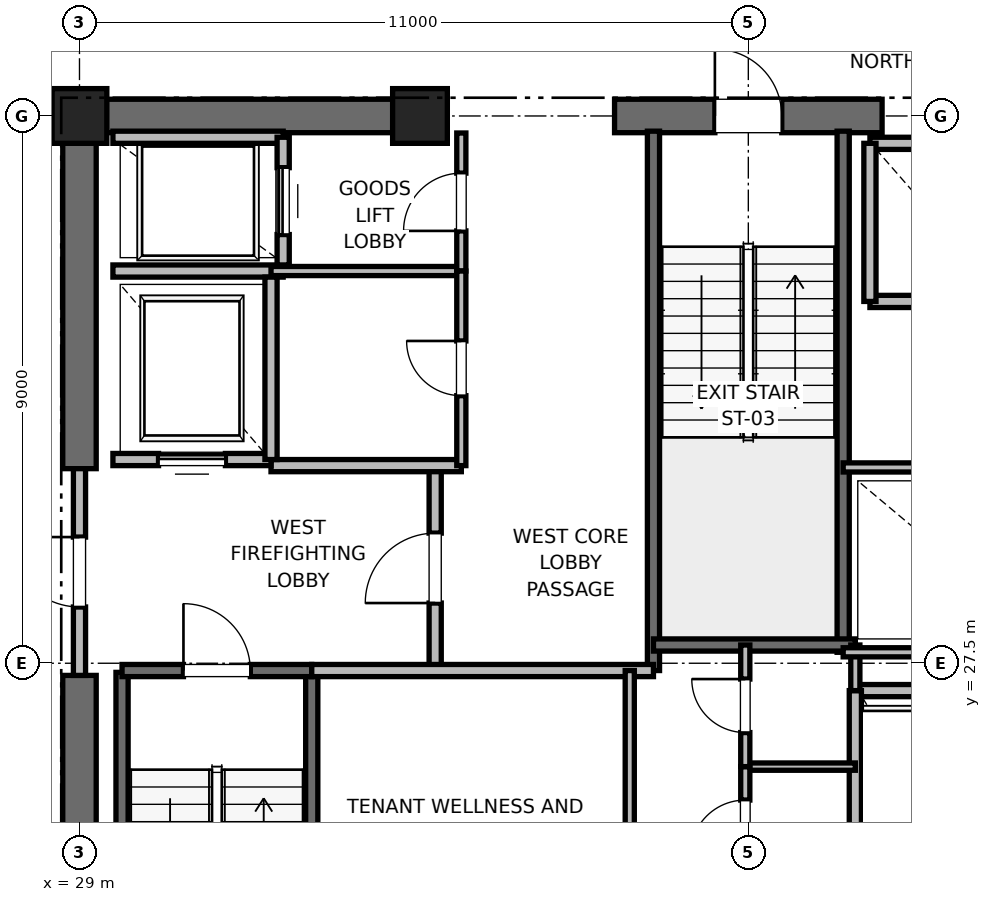
"""IFC4 building model, lengths in metres.
Left out: names, types, materials, properties, quantities, classifications, styles, units other than length and angle.
Written with IfcOpenShell. Run it as: python <this file> out.ifc"""

import sys

from ifc_helpers import new_model, si_unit, direction, frame, frame_2d, origin, origin_2d, place, context, subcontext, project, spatial, rectangle, extrude, element, fill, save


model = new_model("IFC4")
c1 = context("Model", 3, precision=1e-05, world=origin(), true_north=direction((0.0, 1.0)))
c2 = subcontext(c1, "Body", "Model", "MODEL_VIEW")
j1 = project(units=[si_unit("LENGTHUNIT", "METRE"), si_unit("PLANEANGLEUNIT", "RADIAN")], contexts=[c1])
p1 = place(None, origin())
s1 = spatial("IfcSite", under=j1, at=p1, CompositionType="ELEMENT")
p2 = place(p1, origin())
s2 = spatial("IfcBuilding", under=s1, at=p2, CompositionType="ELEMENT")
p3 = place(p2, frame((0.0, 0.0, 225.2)))
s3 = spatial("IfcBuildingStorey", under=s2, at=p3, CompositionType="ELEMENT", Elevation=225.2)
for number, where, z_axis, x_axis in (
    (1, (29.0, 36.5, 0.0), (0.0, 0.0, 1.0), (1.0, 0.0, 0.0)),
    (2, (34.6, 36.5, 0.0), (0.0, 0.0, 1.0), (1.0, 0.0, 0.0)),
):
    element("IfcColumn", number, at=place(p3, frame(where, z_axis=z_axis, x_axis=x_axis)), inside=s3, PredefinedType="PILASTER", context=c2, shape_type="SweptSolid", body=[
        extrude(rectangle(XDim=0.9, YDim=0.9, at=origin_2d()), origin(), (0.0, 0.0, 1.0), 4.0),
    ])
p4 = place(p3, frame((29.0, 36.5, 0.0), z_axis=(0.0, 0.0, 1.0), x_axis=(1.0, 0.0, 0.0)))
e3 = element("IfcWall", 3, at=p4, inside=s3, PredefinedType="SHEAR", context=c2, shape_type="SweptSolid", body=[
    extrude(rectangle(XDim=5.8, YDim=0.55, at=frame_2d((2.9, 0.0))), origin(), (0.0, 0.0, 1.0), 3.775),
])
p5 = place(p3, frame((37.8, 36.5, 0.0), z_axis=(0.0, 0.0, 1.0), x_axis=(1.0, 0.0, 0.0)))
e4 = element("IfcWall", 4, at=p5, inside=s3, PredefinedType="SHEAR", context=c2, shape_type="SweptSolid", body=[
    extrude(rectangle(XDim=4.4, YDim=0.55, at=frame_2d((2.2, 0.0))), origin(), (0.0, 0.0, 1.0), 3.775),
])
p6 = place(p5, frame((1.65, 0.0, 0.0)))
e5 = element("IfcOpeningElement", 5, at=p6, cuts=e4, PredefinedType="OPENING", context=c2, shape_type="SweptSolid", body=[
    extrude(rectangle(XDim=1.1, YDim=2.15, at=frame_2d((0.55, 1.075))), frame((0.0, 0.275, 0.0), z_axis=(0.0, -1.0, 0.0), x_axis=(1.0, 0.0, 0.0)), (0.0, 0.0, 1.0), 0.55),
])
p7 = place(p3, frame((29.0, 18.5, 0.0), z_axis=(0.0, 0.0, 1.0), x_axis=(0.0, 1.0, 0.0)))
e6 = element("IfcWall", 6, at=p7, inside=s3, PredefinedType="SHEAR", context=c2, shape_type="SweptSolid", body=[
    extrude(rectangle(XDim=8.8, YDim=0.55, at=frame_2d((4.4, 0.0))), origin(), (0.0, 0.0, 1.0), 3.775),
])
p8 = place(p3, frame((29.0, 30.7, 0.0), z_axis=(0.0, 0.0, 1.0), x_axis=(0.0, 1.0, 0.0)))
e7 = element("IfcWall", 7, at=p8, inside=s3, PredefinedType="SHEAR", context=c2, shape_type="SweptSolid", body=[
    extrude(rectangle(XDim=5.8, YDim=0.55, at=frame_2d((2.9, 0.0))), origin(), (0.0, 0.0, 1.0), 3.775),
])
p9 = place(p3, frame((29.7, 19.2, 0.0), z_axis=(0.0, 0.0, 1.0), x_axis=(0.0, 1.0, 0.0)))
e8 = element("IfcWall", 8, at=p9, inside=s3, PredefinedType="SOLIDWALL", context=c2, shape_type="SweptSolid", body=[
    extrude(rectangle(XDim=8.15, YDim=0.2, at=frame_2d((4.075, 0.0))), origin(), (0.0, 0.0, 1.0), 3.775),
])
p10 = place(p3, frame((32.82, 18.6, 0.0), z_axis=(0.0, 0.0, 1.0), x_axis=(0.0, 1.0, 0.0)))
e9 = element("IfcWall", 9, at=p10, inside=s3, PredefinedType="SOLIDWALL", context=c2, shape_type="SweptSolid", body=[
    extrude(rectangle(XDim=8.78, YDim=0.2, at=frame_2d((4.39, 0.0))), origin(), (0.0, 0.0, 1.0), 3.775),
])
p11 = place(p3, frame((29.7, 27.38, 0.0), z_axis=(0.0, 0.0, 1.0), x_axis=(1.0, 0.0, 0.0)))
e10 = element("IfcWall", 10, at=p11, inside=s3, PredefinedType="SOLIDWALL", context=c2, shape_type="SweptSolid", body=[
    extrude(rectangle(XDim=3.12, YDim=0.2, at=frame_2d((1.56, 0.0))), origin(), (0.0, 0.0, 1.0), 3.775),
])
p12 = place(p11, frame((1.01, 0.0, 0.0)))
e11 = element("IfcOpeningElement", 11, at=p12, cuts=e10, PredefinedType="OPENING", context=c2, shape_type="SweptSolid", body=[
    extrude(rectangle(XDim=1.1, YDim=2.15, at=frame_2d((0.55, 1.075))), frame((0.0, 0.1, 0.0), z_axis=(0.0, -1.0, 0.0), x_axis=(1.0, 0.0, 0.0)), (0.0, 0.0, 1.0), 0.2),
])
p13 = place(p3, frame((38.44, 27.38, 0.0), z_axis=(0.0, 0.0, 1.0), x_axis=(0.0, 1.0, 0.0)))
e12 = element("IfcWall", 12, at=p13, inside=s3, PredefinedType="SOLIDWALL", context=c2, shape_type="SweptSolid", body=[
    extrude(rectangle(XDim=8.87, YDim=0.2, at=frame_2d((4.435, 0.0))), origin(), (0.0, 0.0, 1.0), 3.775),
])
p14 = place(p3, frame((41.56, 27.68, 0.0), z_axis=(0.0, 0.0, 1.0), x_axis=(0.0, 1.0, 0.0)))
e13 = element("IfcWall", 13, at=p14, inside=s3, PredefinedType="SOLIDWALL", context=c2, shape_type="SweptSolid", body=[
    extrude(rectangle(XDim=8.57, YDim=0.2, at=frame_2d((4.285, 0.0))), origin(), (0.0, 0.0, 1.0), 3.775),
])
p15 = place(p3, frame((38.44, 27.8, 0.0), z_axis=(0.0, 0.0, 1.0), x_axis=(1.0, 0.0, 0.0)))
e14 = element("IfcWall", 14, at=p15, inside=s3, PredefinedType="SOLIDWALL", context=c2, shape_type="SweptSolid", body=[
    extrude(rectangle(XDim=3.32, YDim=0.2, at=frame_2d((1.66, 0.0))), origin(), (0.0, 0.0, 1.0), 3.775),
])
p16 = place(p3, frame((34.85, 27.38, 0.0), z_axis=(0.0, 0.0, 1.0), x_axis=(0.0, 1.0, 0.0)))
e15 = element("IfcWall", 15, at=p16, inside=s3, PredefinedType="PARTITIONING", context=c2, shape_type="SweptSolid", body=[
    extrude(rectangle(XDim=3.37, YDim=0.2, at=frame_2d((1.685, 0.0))), origin(), (0.0, 0.0, 1.0), 3.775),
])
p17 = place(p16, frame((1.11, 0.0, 0.0)))
e16 = element("IfcOpeningElement", 16, at=p17, cuts=e15, PredefinedType="OPENING", context=c2, shape_type="SweptSolid", body=[
    extrude(rectangle(XDim=1.15, YDim=2.2, at=frame_2d((0.575, 1.1))), frame((0.0, 0.1, 0.0), z_axis=(0.0, -1.0, 0.0), x_axis=(1.0, 0.0, 0.0)), (0.0, 0.0, 1.0), 0.2),
])
p18 = place(p3, frame((29.0, 27.3, 0.0), z_axis=(0.0, 0.0, 1.0), x_axis=(0.0, 1.0, 0.0)))
e17 = element("IfcWall", 17, at=p18, inside=s3, PredefinedType="PARTITIONING", context=c2, shape_type="SweptSolid", body=[
    extrude(rectangle(XDim=3.4, YDim=0.2, at=frame_2d((1.7, 0.0))), origin(), (0.0, 0.0, 1.0), 2.755),
])
p19 = place(p18, frame((1.125, 0.0, 0.0)))
e18 = element("IfcOpeningElement", 18, at=p19, cuts=e17, PredefinedType="OPENING", context=c2, shape_type="SweptSolid", body=[
    extrude(rectangle(XDim=1.15, YDim=2.2, at=frame_2d((0.575, 1.1))), frame((0.0, 0.1, 0.0), z_axis=(0.0, -1.0, 0.0), x_axis=(1.0, 0.0, 0.0)), (0.0, 0.0, 1.0), 0.2),
])
p20 = place(p3, frame((32.82, 27.38, 0.0), z_axis=(0.0, 0.0, 1.0), x_axis=(1.0, 0.0, 0.0)))
e19 = element("IfcWall", 19, at=p20, inside=s3, PredefinedType="PARTITIONING", context=c2, shape_type="SweptSolid", body=[
    extrude(rectangle(XDim=5.62, YDim=0.2, at=frame_2d((2.81, 0.0))), origin(), (0.0, 0.0, 1.0), 3.775),
])
p21 = place(p3, frame((32.15, 30.75, 0.0), z_axis=(0.0, 0.0, 1.0), x_axis=(1.0, 0.0, 0.0)))
e20 = element("IfcWall", 20, at=p21, inside=s3, PredefinedType="PARTITIONING", context=c2, shape_type="SweptSolid", body=[
    extrude(rectangle(XDim=3.13, YDim=0.2, at=frame_2d((1.565, 0.0))), origin(), (0.0, 0.0, 1.0), 3.775),
])
p22 = place(p3, frame((29.55, 30.85, 0.0), z_axis=(0.0, 0.0, 1.0), x_axis=(1.0, 0.0, 0.0)))
e21 = element("IfcWall", 21, at=p22, inside=s3, PredefinedType="SOLIDWALL", context=c2, shape_type="SweptSolid", body=[
    extrude(rectangle(XDim=2.6, YDim=0.2, at=frame_2d((1.3, 0.0))), origin(), (0.0, 0.0, 1.0), 2.755),
])
p23 = place(p22, frame((0.75, 0.0, 0.0)))
e22 = element("IfcOpeningElement", 22, at=p23, cuts=e21, PredefinedType="OPENING", context=c2, shape_type="SweptSolid", body=[
    extrude(rectangle(XDim=1.1, YDim=2.2, at=frame_2d((0.55, 1.1))), frame((0.0, 0.1, 0.0), z_axis=(0.0, -1.0, 0.0), x_axis=(1.0, 0.0, 0.0)), (0.0, 0.0, 1.0), 0.2),
])
p24 = place(p3, frame((29.55, 33.95, 0.0), z_axis=(0.0, 0.0, 1.0), x_axis=(1.0, 0.0, 0.0)))
e23 = element("IfcWall", 23, at=p24, inside=s3, PredefinedType="SOLIDWALL", context=c2, shape_type="SweptSolid", body=[
    extrude(rectangle(XDim=2.8, YDim=0.2, at=frame_2d((1.4, 0.0))), origin(), (0.0, 0.0, 1.0), 3.775),
])
p25 = place(p3, frame((32.15, 30.85, 0.0), z_axis=(0.0, 0.0, 1.0), x_axis=(0.0, 1.0, 0.0)))
e24 = element("IfcWall", 24, at=p25, inside=s3, PredefinedType="SOLIDWALL", context=c2, shape_type="SweptSolid", body=[
    extrude(rectangle(XDim=3.0, YDim=0.2, at=frame_2d((1.5, 0.0))), origin(), (0.0, 0.0, 1.0), 3.775),
])
p26 = place(p3, frame((32.35, 36.15, 0.0), z_axis=(0.0, 0.0, 1.0), x_axis=(-1.0, 0.0, 0.0)))
e25 = element("IfcWall", 25, at=p26, inside=s3, PredefinedType="SOLIDWALL", context=c2, shape_type="SweptSolid", body=[
    extrude(rectangle(XDim=2.8, YDim=0.2, at=frame_2d((1.4, 0.0))), origin(), (0.0, 0.0, 1.0), 3.062),
])
p27 = place(p3, frame((32.35, 34.05, 0.0), z_axis=(0.0, 0.0, 1.0), x_axis=(0.0, 1.0, 0.0)))
e26 = element("IfcWall", 26, at=p27, inside=s3, PredefinedType="SOLIDWALL", context=c2, shape_type="SweptSolid", body=[
    extrude(rectangle(XDim=2.1, YDim=0.2, at=frame_2d((1.05, 0.0))), origin(), (0.0, 0.0, 1.0), 3.775),
])
p28 = place(p27, frame((0.5, 0.0, 0.0)))
e27 = element("IfcOpeningElement", 27, at=p28, cuts=e26, PredefinedType="OPENING", context=c2, shape_type="SweptSolid", body=[
    extrude(rectangle(XDim=1.1, YDim=2.2, at=frame_2d((0.55, 1.1))), frame((0.0, 0.1, 0.0), z_axis=(0.0, -1.0, 0.0), x_axis=(1.0, 0.0, 0.0)), (0.0, 0.0, 1.0), 0.2),
])
p29 = place(p3, frame((43.44, 27.05, 0.0), z_axis=(0.0, 0.0, 1.0), x_axis=(-1.0, 0.0, 0.0)))
e28 = element("IfcWall", 28, at=p29, inside=s3, PredefinedType="SOLIDWALL", context=c2, shape_type="SweptSolid", body=[
    extrude(rectangle(XDim=1.68, YDim=0.2, at=frame_2d((0.84, 0.0))), origin(), (0.0, 0.0, 1.0), 3.775),
])
p30 = place(p3, frame((41.76, 27.05, 0.0), z_axis=(0.0, 0.0, 1.0), x_axis=(0.0, -1.0, 0.0)))
e29 = element("IfcWall", 29, at=p30, inside=s3, PredefinedType="SOLIDWALL", context=c2, shape_type="SweptSolid", body=[
    extrude(rectangle(XDim=2.6, YDim=0.2, at=frame_2d((1.3, 0.0))), origin(), (0.0, 0.0, 1.0), 3.775),
])
p31 = place(p3, frame((42.0, 33.45, 0.0), z_axis=(0.0, 0.0, 1.0), x_axis=(1.0, 0.0, 0.0)))
e30 = element("IfcWall", 30, at=p31, inside=s3, PredefinedType="SOLIDWALL", context=c2, shape_type="SweptSolid", body=[
    extrude(rectangle(XDim=2.3, YDim=0.2, at=frame_2d((1.15, 0.0))), origin(), (0.0, 0.0, 1.0), 3.775),
])
p32 = place(p3, frame((44.3, 36.05, 0.0), z_axis=(0.0, 0.0, 1.0), x_axis=(-1.0, 0.0, 0.0)))
e31 = element("IfcWall", 31, at=p32, inside=s3, PredefinedType="SOLIDWALL", context=c2, shape_type="SweptSolid", body=[
    extrude(rectangle(XDim=2.3, YDim=0.2, at=frame_2d((1.15, 0.0))), origin(), (0.0, 0.0, 1.0), 2.755),
])
p33 = place(p3, frame((42.0, 36.05, 0.0), z_axis=(0.0, 0.0, 1.0), x_axis=(0.0, -1.0, 0.0)))
e32 = element("IfcWall", 32, at=p33, inside=s3, PredefinedType="SOLIDWALL", context=c2, shape_type="SweptSolid", body=[
    extrude(rectangle(XDim=2.6, YDim=0.2, at=frame_2d((1.3, 0.0))), origin(), (0.0, 0.0, 1.0), 2.755),
])
p34 = place(p3, frame((39.95, 25.8, 0.0), z_axis=(0.0, 0.0, 1.0), x_axis=(1.0, 0.0, 0.0)))
e33 = element("IfcWall", 33, at=p34, inside=s3, PredefinedType="PARTITIONING", context=c2, shape_type="SweptSolid", body=[
    extrude(rectangle(XDim=1.81, YDim=0.12, at=frame_2d((0.905, 0.0))), origin(), (0.0, 0.0, 1.0), 2.85),
])
p35 = place(p3, frame((41.76, 27.05, 0.0), z_axis=(0.0, 0.0, 1.0), x_axis=(0.0, 1.0, 0.0)))
e34 = element("IfcWall", 34, at=p35, inside=s3, PredefinedType="PARTITIONING", context=c2, shape_type="SweptSolid", body=[
    extrude(rectangle(XDim=0.75, YDim=0.15, at=frame_2d((0.375, 0.0))), origin(), (0.0, 0.0, 1.0), 2.85),
])
p36 = place(p3, frame((39.95, 23.8, 0.0), z_axis=(0.0, 0.0, 1.0), x_axis=(0.0, 1.0, 0.0)))
e35 = element("IfcWall", 35, at=p36, inside=s3, PredefinedType="PARTITIONING", context=c2, shape_type="SweptSolid", body=[
    extrude(rectangle(XDim=2.0, YDim=0.15, at=frame_2d((1.0, 0.0))), origin(), (0.0, 0.0, 1.0), 2.85),
])
p37 = place(p36, frame((0.55, 0.0, 0.0)))
e36 = element("IfcOpeningElement", 36, at=p37, cuts=e35, PredefinedType="OPENING", context=c2, shape_type="SweptSolid", body=[
    extrude(rectangle(XDim=0.9, YDim=2.1, at=frame_2d((0.45, 1.05))), frame((0.0, 0.075, 0.0), z_axis=(0.0, -1.0, 0.0), x_axis=(1.0, 0.0, 0.0)), (0.0, 0.0, 1.0), 0.15),
])
p38 = place(p3, frame((39.95, 25.8, 0.0), z_axis=(0.0, 0.0, 1.0), x_axis=(0.0, 1.0, 0.0)))
e37 = element("IfcWall", 37, at=p38, inside=s3, PredefinedType="PARTITIONING", context=c2, shape_type="SweptSolid", body=[
    extrude(rectangle(XDim=2.0, YDim=0.15, at=frame_2d((1.0, 0.0))), origin(), (0.0, 0.0, 1.0), 2.85),
])
p39 = place(p38, frame((0.56, 0.0, 0.0)))
e38 = element("IfcOpeningElement", 38, at=p39, cuts=e37, PredefinedType="OPENING", context=c2, shape_type="SweptSolid", body=[
    extrude(rectangle(XDim=0.88, YDim=2.1, at=frame_2d((0.44, 1.05))), frame((0.0, 0.075, 0.0), z_axis=(0.0, -1.0, 0.0), x_axis=(1.0, 0.0, 0.0)), (0.0, 0.0, 1.0), 0.15),
])
p40 = place(p3, frame((32.15, 33.95, 0.0), z_axis=(0.0, 0.0, 1.0), x_axis=(1.0, 0.0, 0.0)))
e39 = element("IfcWall", 39, at=p40, inside=s3, PredefinedType="PARTITIONING", context=c2, shape_type="SweptSolid", body=[
    extrude(rectangle(XDim=3.13, YDim=0.15, at=frame_2d((1.565, 0.0))), origin(), (0.0, 0.0, 1.0), 2.85),
])
p41 = place(p3, frame((35.28, 33.95, 0.0), z_axis=(0.0, 0.0, 1.0), x_axis=(0.0, 1.0, 0.0)))
e40 = element("IfcWall", 40, at=p41, inside=s3, PredefinedType="PARTITIONING", context=c2, shape_type="SweptSolid", body=[
    extrude(rectangle(XDim=2.27, YDim=0.15, at=frame_2d((1.135, 0.0))), origin(), (0.0, 0.0, 1.0), 2.755),
])
p42 = place(p41, frame((0.66, 0.0, 0.0)))
e41 = element("IfcOpeningElement", 41, at=p42, cuts=e40, PredefinedType="OPENING", context=c2, shape_type="SweptSolid", body=[
    extrude(rectangle(XDim=0.95, YDim=2.15, at=frame_2d((0.475, 1.075))), frame((0.0, 0.075, 0.0), z_axis=(0.0, -1.0, 0.0), x_axis=(1.0, 0.0, 0.0)), (0.0, 0.0, 1.0), 0.15),
])
p43 = place(p3, frame((35.28, 30.75, 0.0), z_axis=(0.0, 0.0, 1.0), x_axis=(0.0, 1.0, 0.0)))
e42 = element("IfcWall", 42, at=p43, inside=s3, PredefinedType="PARTITIONING", context=c2, shape_type="SweptSolid", body=[
    extrude(rectangle(XDim=3.2, YDim=0.15, at=frame_2d((1.6, 0.0))), origin(), (0.0, 0.0, 1.0), 2.85),
])
p44 = place(p43, frame((1.15, 0.0, 0.0)))
e43 = element("IfcOpeningElement", 43, at=p44, cuts=e42, PredefinedType="OPENING", context=c2, shape_type="SweptSolid", body=[
    extrude(rectangle(XDim=0.9, YDim=2.1, at=frame_2d((0.45, 1.05))), frame((0.0, 0.075, 0.0), z_axis=(0.0, -1.0, 0.0), x_axis=(1.0, 0.0, 0.0)), (0.0, 0.0, 1.0), 0.15),
])
p45 = place(p3, frame((38.05, 18.6, 0.0), z_axis=(0.0, 0.0, 1.0), x_axis=(0.0, 1.0, 0.0)))
e44 = element("IfcWall", 44, at=p45, inside=s3, PredefinedType="PARTITIONING", context=c2, shape_type="SweptSolid", body=[
    extrude(rectangle(XDim=8.78, YDim=0.15, at=frame_2d((4.39, 0.0))), origin(), (0.0, 0.0, 1.0), 2.755),
])
p46 = place(p45, frame((3.89, 0.0, 0.0)))
e45 = element("IfcOpeningElement", 45, at=p46, cuts=e44, PredefinedType="OPENING", context=c2, shape_type="SweptSolid", body=[
    extrude(rectangle(XDim=1.0, YDim=2.15, at=frame_2d((0.5, 1.075))), frame((0.0, 0.075, 0.0), z_axis=(0.0, -1.0, 0.0), x_axis=(1.0, 0.0, 0.0)), (0.0, 0.0, 1.0), 0.15),
])
p47 = place(p3, frame((41.56, 27.68, 0.0), z_axis=(0.0, 0.0, 1.0), x_axis=(1.0, 0.0, 0.0)))
e46 = element("IfcWall", 46, at=p47, inside=s3, PredefinedType="PARTITIONING", context=c2, shape_type="SweptSolid", body=[
    extrude(rectangle(XDim=3.59, YDim=0.15, at=frame_2d((1.795, 0.0))), origin(), (0.0, 0.0, 1.0), 2.85),
])
p48 = place(p3, frame((41.56, 30.72, 0.0), z_axis=(0.0, 0.0, 1.0), x_axis=(1.0, 0.0, 0.0)))
e47 = element("IfcWall", 47, at=p48, inside=s3, PredefinedType="PARTITIONING", context=c2, shape_type="SweptSolid", body=[
    extrude(rectangle(XDim=3.59, YDim=0.15, at=frame_2d((1.795, 0.0))), origin(), (0.0, 0.0, 1.0), 2.85),
])
p49 = place(p48, frame((1.355, 0.0, 0.0)))
e48 = element("IfcOpeningElement", 48, at=p49, cuts=e47, PredefinedType="OPENING", context=c2, shape_type="SweptSolid", body=[
    extrude(rectangle(XDim=0.88, YDim=2.1, at=frame_2d((0.44, 1.05))), frame((0.0, 0.075, 0.0), z_axis=(0.0, -1.0, 0.0), x_axis=(1.0, 0.0, 0.0)), (0.0, 0.0, 1.0), 0.15),
])
p50 = place(p12, origin())
e49 = element("IfcDoor", 49, at=p50, inside=s3, OperationType="SINGLE_SWING_LEFT", PredefinedType="DOOR", context=c2, shape_type="SweptSolid", body=[
    extrude(rectangle(XDim=1.1, YDim=2.15, at=frame_2d((0.55, 1.075))), frame((0.0, 0.025, 0.0), z_axis=(0.0, -1.0, 0.0), x_axis=(1.0, 0.0, 0.0)), (0.0, 0.0, 1.0), 0.05),
])
fill(e11, e49)
p51 = place(p6, origin())
e50 = element("IfcDoor", 50, at=p51, inside=s3, OperationType="SINGLE_SWING_LEFT", PredefinedType="DOOR", context=c2, shape_type="SweptSolid", body=[
    extrude(rectangle(XDim=1.1, YDim=2.15, at=frame_2d((0.55, 1.075))), frame((0.0, 0.025, 0.0), z_axis=(0.0, -1.0, 0.0), x_axis=(1.0, 0.0, 0.0)), (0.0, 0.0, 1.0), 0.05),
])
fill(e5, e50)
p52 = place(p17, origin())
e51 = element("IfcDoor", 51, at=p52, inside=s3, OperationType="SINGLE_SWING_LEFT", PredefinedType="DOOR", context=c2, shape_type="SweptSolid", body=[
    extrude(rectangle(XDim=1.15, YDim=2.2, at=frame_2d((0.575, 1.1))), frame((0.0, 0.025, 0.0), z_axis=(0.0, -1.0, 0.0), x_axis=(1.0, 0.0, 0.0)), (0.0, 0.0, 1.0), 0.05),
])
fill(e16, e51)
p53 = place(p19, origin())
e52 = element("IfcDoor", 52, at=p53, inside=s3, OperationType="SINGLE_SWING_RIGHT", PredefinedType="DOOR", context=c2, shape_type="SweptSolid", body=[
    extrude(rectangle(XDim=1.15, YDim=2.2, at=frame_2d((0.575, 1.1))), frame((0.0, 0.025, 0.0), z_axis=(0.0, -1.0, 0.0), x_axis=(1.0, 0.0, 0.0)), (0.0, 0.0, 1.0), 0.05),
])
fill(e18, e52)
p54 = place(p23, origin())
e53 = element("IfcDoor", 53, at=p54, inside=s3, OperationType="SLIDING_TO_RIGHT", PredefinedType="DOOR", context=c2, shape_type="SweptSolid", body=[
    extrude(rectangle(XDim=1.1, YDim=2.2, at=frame_2d((0.55, 1.1))), frame((0.0, 0.025, 0.0), z_axis=(0.0, -1.0, 0.0), x_axis=(1.0, 0.0, 0.0)), (0.0, 0.0, 1.0), 0.05),
])
fill(e22, e53)
p55 = place(p28, origin())
e54 = element("IfcDoor", 54, at=p55, inside=s3, OperationType="SLIDING_TO_RIGHT", PredefinedType="DOOR", context=c2, shape_type="SweptSolid", body=[
    extrude(rectangle(XDim=1.1, YDim=2.2, at=frame_2d((0.55, 1.1))), frame((0.0, 0.025, 0.0), z_axis=(0.0, -1.0, 0.0), x_axis=(1.0, 0.0, 0.0)), (0.0, 0.0, 1.0), 0.05),
])
fill(e27, e54)
p56 = place(p37, origin())
e55 = element("IfcDoor", 55, at=p56, inside=s3, OperationType="SINGLE_SWING_LEFT", PredefinedType="DOOR", context=c2, shape_type="SweptSolid", body=[
    extrude(rectangle(XDim=0.9, YDim=2.1, at=frame_2d((0.45, 1.05))), frame((0.0, 0.025, 0.0), z_axis=(0.0, -1.0, 0.0), x_axis=(1.0, 0.0, 0.0)), (0.0, 0.0, 1.0), 0.05),
])
fill(e36, e55)
p57 = place(p39, origin())
e56 = element("IfcDoor", 56, at=p57, inside=s3, OperationType="SINGLE_SWING_RIGHT", PredefinedType="DOOR", context=c2, shape_type="SweptSolid", body=[
    extrude(rectangle(XDim=0.88, YDim=2.1, at=frame_2d((0.44, 1.05))), frame((0.0, 0.025, 0.0), z_axis=(0.0, -1.0, 0.0), x_axis=(1.0, 0.0, 0.0)), (0.0, 0.0, 1.0), 0.05),
])
fill(e38, e56)
p58 = place(p42, origin())
e57 = element("IfcDoor", 57, at=p58, inside=s3, OperationType="SINGLE_SWING_LEFT", PredefinedType="DOOR", context=c2, shape_type="SweptSolid", body=[
    extrude(rectangle(XDim=0.95, YDim=2.15, at=frame_2d((0.475, 1.075))), frame((0.0, 0.025, 0.0), z_axis=(0.0, -1.0, 0.0), x_axis=(1.0, 0.0, 0.0)), (0.0, 0.0, 1.0), 0.05),
])
fill(e41, e57)
p59 = place(p44, origin())
e58 = element("IfcDoor", 58, at=p59, inside=s3, OperationType="SINGLE_SWING_RIGHT", PredefinedType="DOOR", context=c2, shape_type="SweptSolid", body=[
    extrude(rectangle(XDim=0.9, YDim=2.1, at=frame_2d((0.45, 1.05))), frame((0.0, 0.025, 0.0), z_axis=(0.0, -1.0, 0.0), x_axis=(1.0, 0.0, 0.0)), (0.0, 0.0, 1.0), 0.05),
])
fill(e43, e58)
save(model, sys.argv[1])
